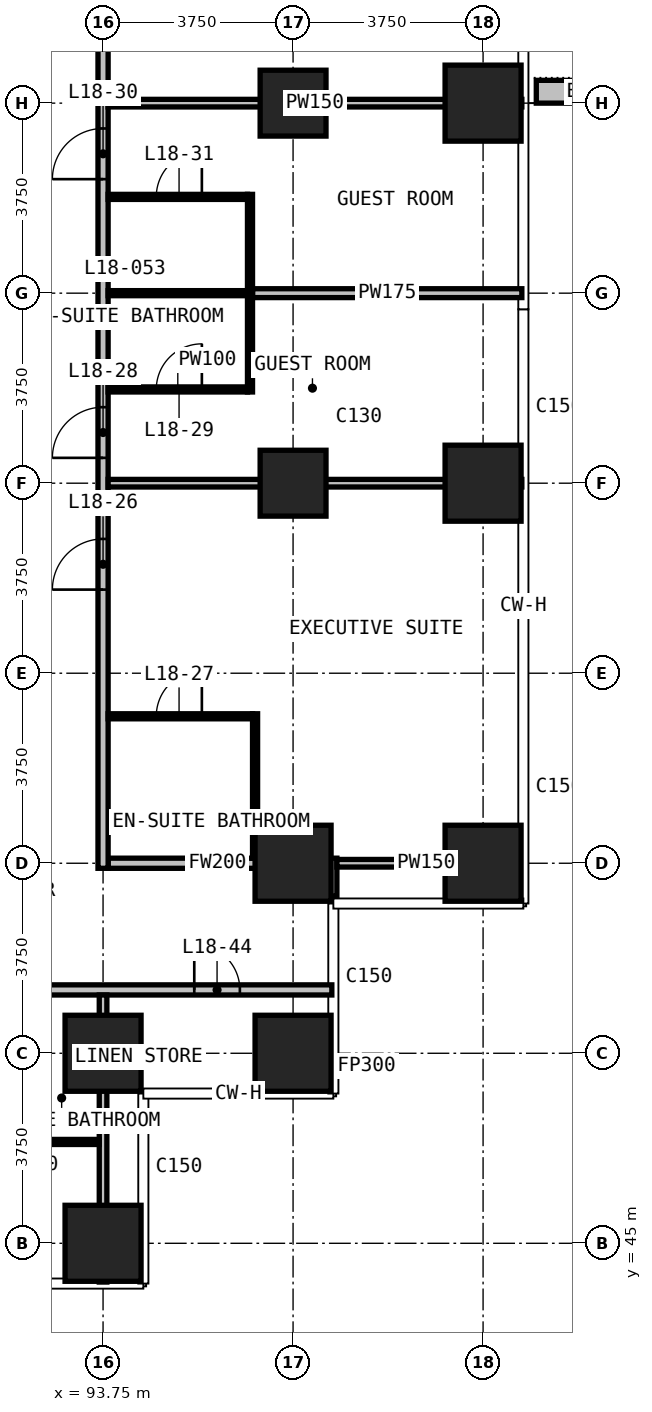
"""IFC4 building model, lengths in metres.
Left out: names, types, materials, properties, quantities, classifications, styles, units other than length and angle.
Written with IfcOpenShell. Run it as: python <this file> out.ifc"""

import sys

from ifc_helpers import new_model, si_unit, direction, frame, frame_2d, origin, origin_2d, place, context, subcontext, project, spatial, rectangle, extrude, element, fill, save


model = new_model("IFC4")
c1 = context("Model", 3, precision=1e-05, world=origin(), true_north=direction((0.0, 1.0)))
c2 = subcontext(c1, "Body", "Model", "MODEL_VIEW")
j1 = project(units=[si_unit("LENGTHUNIT", "METRE"), si_unit("PLANEANGLEUNIT", "RADIAN")], contexts=[c1])
p1 = place(None, origin())
s1 = spatial("IfcSite", under=j1, at=p1, CompositionType="ELEMENT")
p2 = place(p1, origin())
s2 = spatial("IfcBuilding", under=s1, at=p2, CompositionType="ELEMENT")
p3 = place(p2, frame((0.0, 0.0, 79.1)))
s3 = spatial("IfcBuildingStorey", under=s2, at=p3, CompositionType="ELEMENT", Elevation=79.1)
for number, where, z_axis, x_axis in (
    (1, (93.75, 45.0, 0.0), (0.0, 0.0, 1.0), (1.0, 0.0, 0.0)),
    (2, (93.75, 48.75, 0.0), (0.0, 0.0, 1.0), (1.0, 0.0, 0.0)),
    (3, (97.5, 48.75, 0.0), (0.0, 0.0, 1.0), (1.0, 0.0, 0.0)),
    (4, (97.5, 52.5, 0.0), (0.0, 0.0, 1.0), (1.0, 0.0, 0.0)),
):
    element("IfcColumn", number, at=place(p3, frame(where, z_axis=z_axis, x_axis=x_axis)), inside=s3, PredefinedType="COLUMN", context=c2, shape_type="SweptSolid", body=[
        extrude(rectangle(XDim=1.5, YDim=1.5, at=origin_2d()), origin(), (0.0, 0.0, 1.0), 3.3),
    ])
for number, where, z_axis, x_axis in (
    (5, (97.5, 60.0, 0.0), (0.0, 0.0, 1.0), (1.0, 0.0, 0.0)),
    (6, (97.5, 67.5, 0.0), (0.0, 0.0, 1.0), (1.0, 0.0, 0.0)),
):
    element("IfcColumn", number, at=place(p3, frame(where, z_axis=z_axis, x_axis=x_axis)), inside=s3, PredefinedType="COLUMN", context=c2, shape_type="SweptSolid", body=[
        extrude(rectangle(XDim=1.3, YDim=1.3, at=origin_2d()), origin(), (0.0, 0.0, 1.0), 3.3),
    ])
for number, where, z_axis, x_axis in (
    (7, (101.25, 52.5, 0.0), (0.0, 0.0, 1.0), (1.0, 0.0, 0.0)),
    (8, (101.25, 60.0, 0.0), (0.0, 0.0, 1.0), (1.0, 0.0, 0.0)),
    (9, (101.25, 67.5, 0.0), (0.0, 0.0, 1.0), (1.0, 0.0, 0.0)),
):
    element("IfcColumn", number, at=place(p3, frame(where, z_axis=z_axis, x_axis=x_axis)), inside=s3, PredefinedType="COLUMN", context=c2, shape_type="SweptSolid", body=[
        extrude(rectangle(XDim=1.5, YDim=1.5, at=origin_2d()), origin(), (0.0, 0.0, 1.0), 3.3),
    ])
p4 = place(p3, frame((102.3, 67.725, 0.0), z_axis=(0.0, 0.0, 1.0), x_axis=(1.0, 0.0, 0.0)))
e10 = element("IfcWall", 10, at=p4, inside=s3, PredefinedType="USERDEFINED", context=c2, shape_type="SweptSolid", body=[
    extrude(rectangle(XDim=2.35, YDim=0.45, at=frame_2d((1.175, 0.0))), origin(), (0.0, 0.0, 1.0), 1.1),
])
p5 = place(p3, frame((51.735, 50.0, 0.0), z_axis=(0.0, 0.0, 1.0), x_axis=(1.0, 0.0, 0.0)))
e11 = element("IfcWall", 11, at=p5, inside=s3, PredefinedType="PARTITIONING", context=c2, shape_type="SweptSolid", body=[
    extrude(rectangle(XDim=46.53, YDim=0.2, at=frame_2d((23.265, 0.0))), origin(), (0.0, 0.0, 1.0), 3.0),
])
p6 = place(p5, frame((5.615, 0.0, 0.0)))
e12 = element("IfcOpeningElement", 12, at=p6, cuts=e11, PredefinedType="OPENING", context=c2, shape_type="SweptSolid", body=[
    extrude(rectangle(XDim=1.0, YDim=2.2, at=frame_2d((0.5, 1.1))), frame((0.0, 0.11, 0.0), z_axis=(0.0, -1.0, 0.0), x_axis=(1.0, 0.0, 0.0)), (0.0, 0.0, 1.0), 0.22),
])
p7 = place(p5, frame((17.415, 0.0, 0.0)))
e13 = element("IfcOpeningElement", 13, at=p7, cuts=e11, PredefinedType="OPENING", context=c2, shape_type="SweptSolid", body=[
    extrude(rectangle(XDim=1.0, YDim=2.2, at=frame_2d((0.5, 1.1))), frame((0.0, 0.11, 0.0), z_axis=(0.0, -1.0, 0.0), x_axis=(1.0, 0.0, 0.0)), (0.0, 0.0, 1.0), 0.22),
])
p8 = place(p5, frame((20.615, 0.0, 0.0)))
e14 = element("IfcOpeningElement", 14, at=p8, cuts=e11, PredefinedType="OPENING", context=c2, shape_type="SweptSolid", body=[
    extrude(rectangle(XDim=1.0, YDim=2.2, at=frame_2d((0.5, 1.1))), frame((0.0, 0.11, 0.0), z_axis=(0.0, -1.0, 0.0), x_axis=(1.0, 0.0, 0.0)), (0.0, 0.0, 1.0), 0.22),
])
p9 = place(p5, frame((32.415, 0.0, 0.0)))
e15 = element("IfcOpeningElement", 15, at=p9, cuts=e11, PredefinedType="OPENING", context=c2, shape_type="SweptSolid", body=[
    extrude(rectangle(XDim=1.0, YDim=2.2, at=frame_2d((0.5, 1.1))), frame((0.0, 0.11, 0.0), z_axis=(0.0, -1.0, 0.0), x_axis=(1.0, 0.0, 0.0)), (0.0, 0.0, 1.0), 0.22),
])
p10 = place(p5, frame((35.615, 0.0, 0.0)))
e16 = element("IfcOpeningElement", 16, at=p10, cuts=e11, PredefinedType="OPENING", context=c2, shape_type="SweptSolid", body=[
    extrude(rectangle(XDim=1.0, YDim=2.2, at=frame_2d((0.5, 1.1))), frame((0.0, 0.11, 0.0), z_axis=(0.0, -1.0, 0.0), x_axis=(1.0, 0.0, 0.0)), (0.0, 0.0, 1.0), 0.22),
])
p11 = place(p5, frame((1.8, 0.0, 0.0)))
e17 = element("IfcOpeningElement", 17, at=p11, cuts=e11, PredefinedType="OPENING", context=c2, shape_type="SweptSolid", body=[
    extrude(rectangle(XDim=0.9, YDim=2.2, at=frame_2d((0.45, 1.1))), frame((0.0, 0.11, 0.0), z_axis=(0.0, -1.0, 0.0), x_axis=(1.0, 0.0, 0.0)), (0.0, 0.0, 1.0), 0.22),
])
p12 = place(p5, frame((43.815, 0.0, 0.0)))
e18 = element("IfcOpeningElement", 18, at=p12, cuts=e11, PredefinedType="OPENING", context=c2, shape_type="SweptSolid", body=[
    extrude(rectangle(XDim=0.9, YDim=2.2, at=frame_2d((0.45, 1.1))), frame((0.0, 0.11, 0.0), z_axis=(0.0, -1.0, 0.0), x_axis=(1.0, 0.0, 0.0)), (0.0, 0.0, 1.0), 0.22),
])
p13 = place(p3, frame((93.85, 52.5, 0.0), z_axis=(0.0, 0.0, 1.0), x_axis=(1.0, 0.0, 0.0)))
e19 = element("IfcWall", 19, at=p13, inside=s3, PredefinedType="PARTITIONING", context=c2, shape_type="SweptSolid", body=[
    extrude(rectangle(XDim=4.315, YDim=0.2, at=frame_2d((2.157, 0.0))), origin(), (0.0, 0.0, 1.0), 3.0),
])
p14 = place(p3, frame((93.75, 52.4, 0.0), z_axis=(0.0, 0.0, 1.0), x_axis=(0.0, 1.0, 0.0)))
e20 = element("IfcWall", 20, at=p14, inside=s3, PredefinedType="PARTITIONING", context=c2, shape_type="SweptSolid", body=[
    extrude(rectangle(XDim=38.31, YDim=0.2, at=frame_2d((19.155, 0.0))), origin(), (0.0, 0.0, 1.0), 3.0),
])
p15 = place(p14, frame((5.5, 0.0, 0.0)))
e21 = element("IfcOpeningElement", 21, at=p15, cuts=e20, PredefinedType="OPENING", context=c2, shape_type="SweptSolid", body=[
    extrude(rectangle(XDim=1.0, YDim=2.2, at=frame_2d((0.5, 1.1))), frame((0.0, 0.11, 0.0), z_axis=(0.0, -1.0, 0.0), x_axis=(1.0, 0.0, 0.0)), (0.0, 0.0, 1.0), 0.22),
])
p16 = place(p14, frame((8.1, 0.0, 0.0)))
e22 = element("IfcOpeningElement", 22, at=p16, cuts=e20, PredefinedType="OPENING", context=c2, shape_type="SweptSolid", body=[
    extrude(rectangle(XDim=1.0, YDim=2.2, at=frame_2d((0.5, 1.1))), frame((0.0, 0.11, 0.0), z_axis=(0.0, -1.0, 0.0), x_axis=(1.0, 0.0, 0.0)), (0.0, 0.0, 1.0), 0.22),
])
p17 = place(p14, frame((13.6, 0.0, 0.0)))
e23 = element("IfcOpeningElement", 23, at=p17, cuts=e20, PredefinedType="OPENING", context=c2, shape_type="SweptSolid", body=[
    extrude(rectangle(XDim=1.0, YDim=2.2, at=frame_2d((0.5, 1.1))), frame((0.0, 0.11, 0.0), z_axis=(0.0, -1.0, 0.0), x_axis=(1.0, 0.0, 0.0)), (0.0, 0.0, 1.0), 0.22),
])
p18 = place(p14, frame((16.2, 0.0, 0.0)))
e24 = element("IfcOpeningElement", 24, at=p18, cuts=e20, PredefinedType="OPENING", context=c2, shape_type="SweptSolid", body=[
    extrude(rectangle(XDim=1.0, YDim=2.2, at=frame_2d((0.5, 1.1))), frame((0.0, 0.11, 0.0), z_axis=(0.0, -1.0, 0.0), x_axis=(1.0, 0.0, 0.0)), (0.0, 0.0, 1.0), 0.22),
])
p19 = place(p14, frame((24.85, 0.0, 0.0)))
e25 = element("IfcOpeningElement", 25, at=p19, cuts=e20, PredefinedType="OPENING", context=c2, shape_type="SweptSolid", body=[
    extrude(rectangle(XDim=1.0, YDim=2.2, at=frame_2d((0.5, 1.1))), frame((0.0, 0.11, 0.0), z_axis=(0.0, -1.0, 0.0), x_axis=(1.0, 0.0, 0.0)), (0.0, 0.0, 1.0), 0.22),
])
p20 = place(p14, frame((26.85, 0.0, 0.0)))
e26 = element("IfcOpeningElement", 26, at=p20, cuts=e20, PredefinedType="OPENING", context=c2, shape_type="SweptSolid", body=[
    extrude(rectangle(XDim=1.0, YDim=2.2, at=frame_2d((0.5, 1.1))), frame((0.0, 0.11, 0.0), z_axis=(0.0, -1.0, 0.0), x_axis=(1.0, 0.0, 0.0)), (0.0, 0.0, 1.0), 0.22),
])
p21 = place(p14, frame((31.55, 0.0, 0.0)))
e27 = element("IfcOpeningElement", 27, at=p21, cuts=e20, PredefinedType="OPENING", context=c2, shape_type="SweptSolid", body=[
    extrude(rectangle(XDim=0.9, YDim=2.2, at=frame_2d((0.45, 1.1))), frame((0.0, 0.11, 0.0), z_axis=(0.0, -1.0, 0.0), x_axis=(1.0, 0.0, 0.0)), (0.0, 0.0, 1.0), 0.22),
])
p22 = place(p14, frame((35.65, 0.0, 0.0)))
e28 = element("IfcOpeningElement", 28, at=p22, cuts=e20, PredefinedType="OPENING", context=c2, shape_type="SweptSolid", body=[
    extrude(rectangle(XDim=0.9, YDim=2.2, at=frame_2d((0.45, 1.1))), frame((0.0, 0.11, 0.0), z_axis=(0.0, -1.0, 0.0), x_axis=(1.0, 0.0, 0.0)), (0.0, 0.0, 1.0), 0.22),
])
p23 = place(p3, frame((98.265, 51.855, 0.0), z_axis=(0.0, 0.0, 1.0), x_axis=(0.0, 1.0, 0.0)))
e29 = element("IfcWall", 29, at=p23, inside=s3, PredefinedType="PARTITIONING", context=c2, shape_type="SweptSolid", body=[
    extrude(rectangle(XDim=0.745, YDim=0.2, at=frame_2d((0.373, 0.0))), origin(), (0.0, 0.0, 1.0), 3.0),
])
p24 = place(p3, frame((96.7, 63.75, 0.0), z_axis=(0.0, 0.0, 1.0), x_axis=(1.0, 0.0, 0.0)))
e30 = element("IfcWall", 30, at=p24, inside=s3, PredefinedType="PARTITIONING", context=c2, shape_type="SweptSolid", body=[
    extrude(rectangle(XDim=5.315, YDim=0.175, at=frame_2d((2.657, 0.0))), origin(), (0.0, 0.0, 1.0), 3.0),
])
p25 = place(p3, frame((98.365, 52.5, 0.0), z_axis=(0.0, 0.0, 1.0), x_axis=(1.0, 0.0, 0.0)))
e31 = element("IfcWall", 31, at=p25, inside=s3, PredefinedType="PARTITIONING", context=c2, shape_type="SweptSolid", body=[
    extrude(rectangle(XDim=3.53, YDim=0.15, at=frame_2d((1.765, 0.0))), origin(), (0.0, 0.0, 1.0), 3.0),
])
for number, where, z_axis, x_axis in (
    (32, (93.85, 60.0, 0.0), (0.0, 0.0, 1.0), (1.0, 0.0, 0.0)),
    (33, (93.85, 67.5, 0.0), (0.0, 0.0, 1.0), (1.0, 0.0, 0.0)),
):
    element("IfcWall", number, at=place(p3, frame(where, z_axis=z_axis, x_axis=x_axis)), inside=s3, PredefinedType="PARTITIONING", context=c2, shape_type="SweptSolid", body=[
        extrude(rectangle(XDim=8.165, YDim=0.15, at=frame_2d((4.083, 0.0))), origin(), (0.0, 0.0, 1.0), 3.0),
    ])
p26 = place(p3, frame((93.75, 44.235, 0.0), z_axis=(0.0, 0.0, 1.0), x_axis=(0.0, 1.0, 0.0)))
e34 = element("IfcWall", 34, at=p26, inside=s3, PredefinedType="PARTITIONING", context=c2, shape_type="SweptSolid", body=[
    extrude(rectangle(XDim=5.665, YDim=0.15, at=frame_2d((2.833, 0.0))), origin(), (0.0, 0.0, 1.0), 3.0),
])
p27 = place(p3, frame((90.9, 47.0, 0.0), z_axis=(0.0, 0.0, 1.0), x_axis=(1.0, 0.0, 0.0)))
e35 = element("IfcWall", 35, at=p27, inside=s3, PredefinedType="PARTITIONING", context=c2, shape_type="SweptSolid", body=[
    extrude(rectangle(XDim=2.775, YDim=0.1, at=frame_2d((1.388, 0.0))), origin(), (0.0, 0.0, 1.0), 3.0),
])
p28 = place(p3, frame((93.85, 55.4, 0.0), z_axis=(0.0, 0.0, 1.0), x_axis=(1.0, 0.0, 0.0)))
e36 = element("IfcWall", 36, at=p28, inside=s3, PredefinedType="PARTITIONING", context=c2, shape_type="SweptSolid", body=[
    extrude(rectangle(XDim=2.85, YDim=0.1, at=frame_2d((1.425, 0.0))), origin(), (0.0, 0.0, 1.0), 3.0),
])
p29 = place(p28, frame((0.95, 0.0, 0.0)))
e37 = element("IfcOpeningElement", 37, at=p29, cuts=e36, PredefinedType="OPENING", context=c2, shape_type="SweptSolid", body=[
    extrude(rectangle(XDim=0.9, YDim=2.2, at=frame_2d((0.45, 1.1))), frame((0.0, 0.06, 0.0), z_axis=(0.0, -1.0, 0.0), x_axis=(1.0, 0.0, 0.0)), (0.0, 0.0, 1.0), 0.12),
])
p30 = place(p3, frame((93.85, 61.85, 0.0), z_axis=(0.0, 0.0, 1.0), x_axis=(1.0, 0.0, 0.0)))
e38 = element("IfcWall", 38, at=p30, inside=s3, PredefinedType="PARTITIONING", context=c2, shape_type="SweptSolid", body=[
    extrude(rectangle(XDim=2.75, YDim=0.1, at=frame_2d((1.375, 0.0))), origin(), (0.0, 0.0, 1.0), 3.0),
])
p31 = place(p30, frame((0.95, 0.0, 0.0)))
e39 = element("IfcOpeningElement", 39, at=p31, cuts=e38, PredefinedType="OPENING", context=c2, shape_type="SweptSolid", body=[
    extrude(rectangle(XDim=0.9, YDim=2.2, at=frame_2d((0.45, 1.1))), frame((0.0, 0.06, 0.0), z_axis=(0.0, -1.0, 0.0), x_axis=(1.0, 0.0, 0.0)), (0.0, 0.0, 1.0), 0.12),
])
p32 = place(p3, frame((93.85, 63.75, 0.0), z_axis=(0.0, 0.0, 1.0), x_axis=(1.0, 0.0, 0.0)))
e40 = element("IfcWall", 40, at=p32, inside=s3, PredefinedType="PARTITIONING", context=c2, shape_type="SweptSolid", body=[
    extrude(rectangle(XDim=2.75, YDim=0.1, at=frame_2d((1.375, 0.0))), origin(), (0.0, 0.0, 1.0), 3.0),
])
p33 = place(p3, frame((93.85, 65.65, 0.0), z_axis=(0.0, 0.0, 1.0), x_axis=(1.0, 0.0, 0.0)))
e41 = element("IfcWall", 41, at=p33, inside=s3, PredefinedType="PARTITIONING", context=c2, shape_type="SweptSolid", body=[
    extrude(rectangle(XDim=2.75, YDim=0.1, at=frame_2d((1.375, 0.0))), origin(), (0.0, 0.0, 1.0), 3.0),
])
p34 = place(p33, frame((0.95, 0.0, 0.0)))
e42 = element("IfcOpeningElement", 42, at=p34, cuts=e41, PredefinedType="OPENING", context=c2, shape_type="SweptSolid", body=[
    extrude(rectangle(XDim=0.9, YDim=2.2, at=frame_2d((0.45, 1.1))), frame((0.0, 0.06, 0.0), z_axis=(0.0, -1.0, 0.0), x_axis=(1.0, 0.0, 0.0)), (0.0, 0.0, 1.0), 0.12),
])
p35 = place(p3, frame((96.65, 61.8, 0.0), z_axis=(0.0, 0.0, 1.0), x_axis=(0.0, 1.0, 0.0)))
e43 = element("IfcWall", 43, at=p35, inside=s3, PredefinedType="PARTITIONING", context=c2, shape_type="SweptSolid", body=[
    extrude(rectangle(XDim=3.9, YDim=0.1, at=frame_2d((1.95, 0.0))), origin(), (0.0, 0.0, 1.0), 3.0),
])
p36 = place(p3, frame((96.75, 52.6, 0.0), z_axis=(0.0, 0.0, 1.0), x_axis=(0.0, 1.0, 0.0)))
e44 = element("IfcWall", 44, at=p36, inside=s3, PredefinedType="PARTITIONING", context=c2, shape_type="SweptSolid", body=[
    extrude(rectangle(XDim=2.85, YDim=0.1, at=frame_2d((1.425, 0.0))), origin(), (0.0, 0.0, 1.0), 3.0),
])
p37 = place(p15, origin())
e45 = element("IfcDoor", 45, at=p37, inside=s3, OperationType="SINGLE_SWING_LEFT", PredefinedType="DOOR", context=c2, shape_type="SweptSolid", body=[
    extrude(rectangle(XDim=1.0, YDim=2.2, at=frame_2d((0.5, 1.1))), frame((0.0, 0.025, 0.0), z_axis=(0.0, -1.0, 0.0), x_axis=(1.0, 0.0, 0.0)), (0.0, 0.0, 1.0), 0.05),
])
fill(e21, e45)
p38 = place(p29, origin())
e46 = element("IfcDoor", 46, at=p38, inside=s3, OperationType="SINGLE_SWING_RIGHT", PredefinedType="DOOR", context=c2, shape_type="SweptSolid", body=[
    extrude(rectangle(XDim=0.9, YDim=2.2, at=frame_2d((0.45, 1.1))), frame((0.0, 0.025, 0.0), z_axis=(0.0, -1.0, 0.0), x_axis=(1.0, 0.0, 0.0)), (0.0, 0.0, 1.0), 0.05),
])
fill(e37, e46)
p39 = place(p16, origin())
e47 = element("IfcDoor", 47, at=p39, inside=s3, OperationType="SINGLE_SWING_RIGHT", PredefinedType="DOOR", context=c2, shape_type="SweptSolid", body=[
    extrude(rectangle(XDim=1.0, YDim=2.2, at=frame_2d((0.5, 1.1))), frame((0.0, 0.025, 0.0), z_axis=(0.0, -1.0, 0.0), x_axis=(1.0, 0.0, 0.0)), (0.0, 0.0, 1.0), 0.05),
])
fill(e22, e47)
p40 = place(p31, origin())
e48 = element("IfcDoor", 48, at=p40, inside=s3, OperationType="SINGLE_SWING_RIGHT", PredefinedType="DOOR", context=c2, shape_type="SweptSolid", body=[
    extrude(rectangle(XDim=0.9, YDim=2.2, at=frame_2d((0.45, 1.1))), frame((0.0, 0.025, 0.0), z_axis=(0.0, -1.0, 0.0), x_axis=(1.0, 0.0, 0.0)), (0.0, 0.0, 1.0), 0.05),
])
fill(e39, e48)
p41 = place(p17, origin())
e49 = element("IfcDoor", 49, at=p41, inside=s3, OperationType="SINGLE_SWING_LEFT", PredefinedType="DOOR", context=c2, shape_type="SweptSolid", body=[
    extrude(rectangle(XDim=1.0, YDim=2.2, at=frame_2d((0.5, 1.1))), frame((0.0, 0.025, 0.0), z_axis=(0.0, -1.0, 0.0), x_axis=(1.0, 0.0, 0.0)), (0.0, 0.0, 1.0), 0.05),
])
fill(e23, e49)
p42 = place(p34, origin())
e50 = element("IfcDoor", 50, at=p42, inside=s3, OperationType="SINGLE_SWING_RIGHT", PredefinedType="DOOR", context=c2, shape_type="SweptSolid", body=[
    extrude(rectangle(XDim=0.9, YDim=2.2, at=frame_2d((0.45, 1.1))), frame((0.0, 0.025, 0.0), z_axis=(0.0, -1.0, 0.0), x_axis=(1.0, 0.0, 0.0)), (0.0, 0.0, 1.0), 0.05),
])
fill(e42, e50)
p43 = place(p12, origin())
e51 = element("IfcDoor", 51, at=p43, inside=s3, OperationType="SINGLE_SWING_LEFT", PredefinedType="DOOR", context=c2, shape_type="SweptSolid", body=[
    extrude(rectangle(XDim=0.9, YDim=2.2, at=frame_2d((0.45, 1.1))), frame((0.0, 0.025, 0.0), z_axis=(0.0, -1.0, 0.0), x_axis=(1.0, 0.0, 0.0)), (0.0, 0.0, 1.0), 0.05),
])
fill(e18, e51)
save(model, sys.argv[1])
